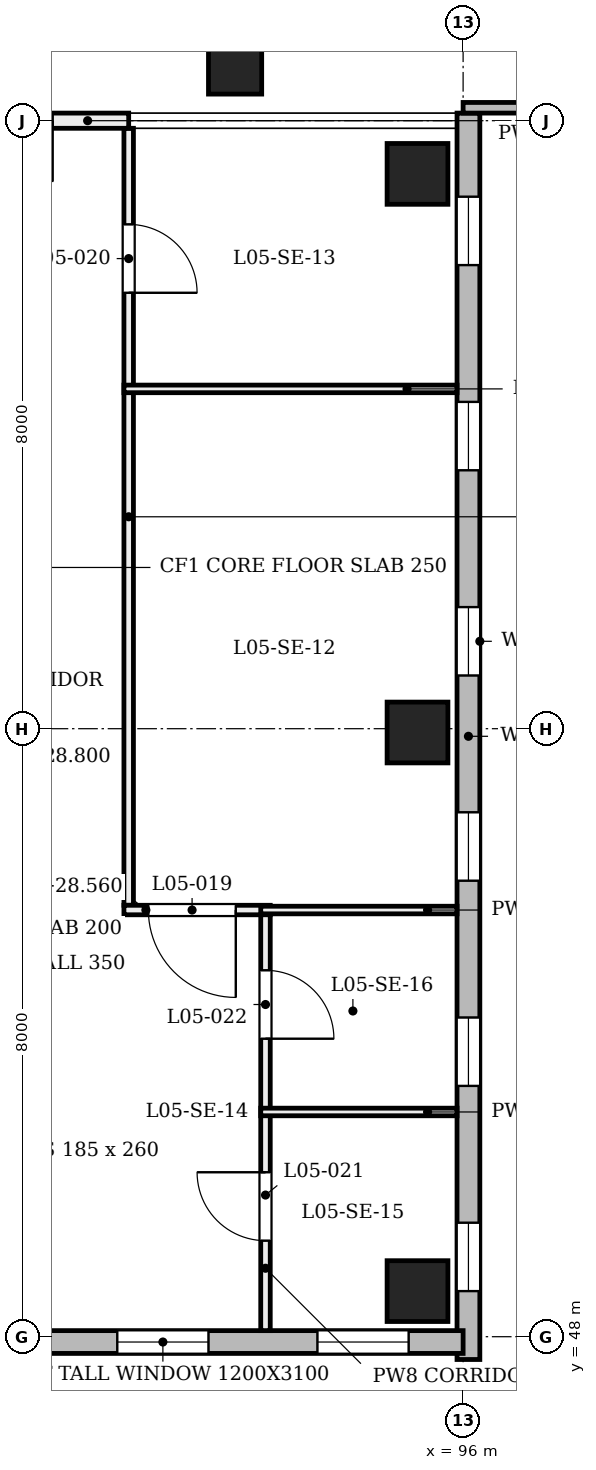
"""IFC4 building model, lengths in metres.
Left out: names, types, materials, properties, quantities, classifications, styles, units other than length and angle.
Written with IfcOpenShell. Run it as: python <this file> out.ifc"""

import sys

from ifc_helpers import new_model, si_unit, direction, frame, frame_2d, origin, origin_2d, place, context, subcontext, project, spatial, rectangle, extrude, element, fill, save


model = new_model("IFC4")
c1 = context("Model", 3, precision=1e-05, world=origin(), true_north=direction((0.0, 1.0)))
c2 = subcontext(c1, "Body", "Model", "MODEL_VIEW")
j1 = project(units=[si_unit("LENGTHUNIT", "METRE"), si_unit("PLANEANGLEUNIT", "RADIAN")], contexts=[c1])
p1 = place(None, origin())
s1 = spatial("IfcSite", under=j1, at=p1, CompositionType="ELEMENT")
p2 = place(p1, origin())
s2 = spatial("IfcBuilding", under=s1, at=p2, CompositionType="ELEMENT")
p3 = place(p2, frame((0.0, 0.0, 24.0)))
s3 = spatial("IfcBuildingStorey", under=s2, at=p3, CompositionType="ELEMENT", Elevation=24.0)
for number, where, z_axis, x_axis in (
    (1, (95.4, 48.6, 0.0), (0.0, 0.0, 1.0), (1.0, 0.0, 0.0)),
    (2, (95.4, 55.95, 0.0), (0.0, 0.0, 1.0), (1.0, 0.0, 0.0)),
    (3, (95.4, 63.3, 0.0), (0.0, 0.0, 1.0), (1.0, 0.0, 0.0)),
):
    element("IfcColumn", number, at=place(p3, frame(where, z_axis=z_axis, x_axis=x_axis)), inside=s3, PredefinedType="COLUMN", context=c2, shape_type="SweptSolid", body=[
        extrude(rectangle(XDim=0.8, YDim=0.8, at=origin_2d()), origin(), (0.0, 0.0, 1.0), 4.8),
    ])
p4 = place(p3, frame((93.0, 64.7, 0.0), z_axis=(0.0, 0.0, 1.0), x_axis=(1.0, 0.0, 0.0)))
e4 = element("IfcColumn", 4, at=p4, inside=s3, PredefinedType="COLUMN", context=c2, shape_type="SweptSolid", body=[
    extrude(rectangle(XDim=0.7, YDim=0.7, at=origin_2d()), origin(), (0.0, 0.0, 1.0), 4.58),
])
p5 = place(p3, frame((96.07, 47.7, 0.0), z_axis=(0.0, 0.0, 1.0), x_axis=(0.0, 1.0, 0.0)))
e5 = element("IfcWall", 5, at=p5, inside=s3, PredefinedType="SOLIDWALL", context=c2, shape_type="SweptSolid", body=[
    extrude(rectangle(XDim=16.4, YDim=0.3, at=frame_2d((8.2, 0.0))), origin(), (0.0, 0.0, 1.0), 3.9),
])
p6 = place(p5, frame((0.9, 0.0, 0.75)))
e6 = element("IfcOpeningElement", 6, at=p6, cuts=e5, PredefinedType="OPENING", context=c2, shape_type="SweptSolid", body=[
    extrude(rectangle(XDim=0.9, YDim=3.1, at=frame_2d((0.45, 1.55))), frame((0.0, 0.16, 0.0), z_axis=(0.0, -1.0, 0.0), x_axis=(1.0, 0.0, 0.0)), (0.0, 0.0, 1.0), 0.32),
])
p7 = place(p5, frame((3.6, 0.0, 0.75)))
e7 = element("IfcOpeningElement", 7, at=p7, cuts=e5, PredefinedType="OPENING", context=c2, shape_type="SweptSolid", body=[
    extrude(rectangle(XDim=0.9, YDim=3.1, at=frame_2d((0.45, 1.55))), frame((0.0, 0.16, 0.0), z_axis=(0.0, -1.0, 0.0), x_axis=(1.0, 0.0, 0.0)), (0.0, 0.0, 1.0), 0.32),
])
p8 = place(p5, frame((6.3, 0.0, 0.75)))
e8 = element("IfcOpeningElement", 8, at=p8, cuts=e5, PredefinedType="OPENING", context=c2, shape_type="SweptSolid", body=[
    extrude(rectangle(XDim=0.9, YDim=3.1, at=frame_2d((0.45, 1.55))), frame((0.0, 0.16, 0.0), z_axis=(0.0, -1.0, 0.0), x_axis=(1.0, 0.0, 0.0)), (0.0, 0.0, 1.0), 0.32),
])
p9 = place(p5, frame((9.0, 0.0, 0.75)))
e9 = element("IfcOpeningElement", 9, at=p9, cuts=e5, PredefinedType="OPENING", context=c2, shape_type="SweptSolid", body=[
    extrude(rectangle(XDim=0.9, YDim=3.1, at=frame_2d((0.45, 1.55))), frame((0.0, 0.16, 0.0), z_axis=(0.0, -1.0, 0.0), x_axis=(1.0, 0.0, 0.0)), (0.0, 0.0, 1.0), 0.32),
])
p10 = place(p5, frame((11.7, 0.0, 0.75)))
e10 = element("IfcOpeningElement", 10, at=p10, cuts=e5, PredefinedType="OPENING", context=c2, shape_type="SweptSolid", body=[
    extrude(rectangle(XDim=0.9, YDim=3.1, at=frame_2d((0.45, 1.55))), frame((0.0, 0.16, 0.0), z_axis=(0.0, -1.0, 0.0), x_axis=(1.0, 0.0, 0.0)), (0.0, 0.0, 1.0), 0.32),
])
p11 = place(p5, frame((14.4, 0.0, 0.75)))
e11 = element("IfcOpeningElement", 11, at=p11, cuts=e5, PredefinedType="OPENING", context=c2, shape_type="SweptSolid", body=[
    extrude(rectangle(XDim=0.9, YDim=3.1, at=frame_2d((0.45, 1.55))), frame((0.0, 0.16, 0.0), z_axis=(0.0, -1.0, 0.0), x_axis=(1.0, 0.0, 0.0)), (0.0, 0.0, 1.0), 0.32),
])
p12 = place(p3, frame((88.1, 47.93, 0.0), z_axis=(0.0, 0.0, 1.0), x_axis=(1.0, 0.0, 0.0)))
e12 = element("IfcWall", 12, at=p12, inside=s3, PredefinedType="SOLIDWALL", context=c2, shape_type="SweptSolid", body=[
    extrude(rectangle(XDim=7.9, YDim=0.3, at=frame_2d((3.95, 0.0))), origin(), (0.0, 0.0, 1.0), 3.9),
])
p13 = place(p12, frame((0.717, 0.0, 0.75)))
e13 = element("IfcOpeningElement", 13, at=p13, cuts=e12, PredefinedType="OPENING", context=c2, shape_type="SweptSolid", body=[
    extrude(rectangle(XDim=1.2, YDim=3.1, at=frame_2d((0.6, 1.55))), frame((0.0, 0.16, 0.0), z_axis=(0.0, -1.0, 0.0), x_axis=(1.0, 0.0, 0.0)), (0.0, 0.0, 1.0), 0.32),
])
p14 = place(p12, frame((3.35, 0.0, 0.75)))
e14 = element("IfcOpeningElement", 14, at=p14, cuts=e12, PredefinedType="OPENING", context=c2, shape_type="SweptSolid", body=[
    extrude(rectangle(XDim=1.2, YDim=3.1, at=frame_2d((0.6, 1.55))), frame((0.0, 0.16, 0.0), z_axis=(0.0, -1.0, 0.0), x_axis=(1.0, 0.0, 0.0)), (0.0, 0.0, 1.0), 0.32),
])
p15 = place(p12, frame((5.983, 0.0, 0.75)))
e15 = element("IfcOpeningElement", 15, at=p15, cuts=e12, PredefinedType="OPENING", context=c2, shape_type="SweptSolid", body=[
    extrude(rectangle(XDim=1.2, YDim=3.1, at=frame_2d((0.6, 1.55))), frame((0.0, 0.16, 0.0), z_axis=(0.0, -1.0, 0.0), x_axis=(1.0, 0.0, 0.0)), (0.0, 0.0, 1.0), 0.32),
])
p16 = place(p3, frame((96.0, 64.17, 0.0), z_axis=(0.0, 0.0, 1.0), x_axis=(1.0, 0.0, 0.0)))
e16 = element("IfcWall", 16, at=p16, inside=s3, PredefinedType="SOLIDWALL", context=c2, shape_type="SweptSolid", body=[
    extrude(rectangle(XDim=5.0, YDim=0.14, at=frame_2d((2.5, 0.0))), origin(), (0.0, 0.0, 1.0), 3.9),
])
p17 = place(p3, frame((91.6, 53.677, 0.0), z_axis=(0.0, 0.0, 1.0), x_axis=(0.0, 1.0, 0.0)))
e17 = element("IfcWall", 17, at=p17, inside=s3, PredefinedType="PARTITIONING", context=c2, shape_type="SweptSolid", body=[
    extrude(rectangle(XDim=10.223, YDim=0.125, at=frame_2d((5.112, 0.0))), origin(), (0.0, 0.0, 1.0), 3.88),
])
p18 = place(p17, frame((8.059, 0.0, 0.0)))
e18 = element("IfcOpeningElement", 18, at=p18, cuts=e17, PredefinedType="OPENING", context=c2, shape_type="SweptSolid", body=[
    extrude(rectangle(XDim=0.9, YDim=2.1, at=frame_2d((0.45, 1.05))), frame((0.0, 0.073, 0.0), z_axis=(0.0, -1.0, 0.0), x_axis=(1.0, 0.0, 0.0)), (0.0, 0.0, 1.0), 0.145),
])
p19 = place(p3, frame((91.538, 53.614, 0.0), z_axis=(0.0, 0.0, 1.0), x_axis=(1.0, 0.0, 0.0)))
e19 = element("IfcWall", 19, at=p19, inside=s3, PredefinedType="PARTITIONING", context=c2, shape_type="SweptSolid", body=[
    extrude(rectangle(XDim=1.925, YDim=0.125, at=frame_2d((0.962, 0.0))), origin(), (0.0, 0.0, 1.0), 4.56),
])
p20 = place(p19, frame((0.322, 0.0, 0.0)))
e20 = element("IfcOpeningElement", 20, at=p20, cuts=e19, PredefinedType="OPENING", context=c2, shape_type="SweptSolid", body=[
    extrude(rectangle(XDim=1.15, YDim=2.1, at=frame_2d((0.575, 1.05))), frame((0.0, 0.073, 0.0), z_axis=(0.0, -1.0, 0.0), x_axis=(1.0, 0.0, 0.0)), (0.0, 0.0, 1.0), 0.145),
])
p21 = place(p3, frame((93.337, 53.614, 0.0), z_axis=(0.0, 0.0, 1.0), x_axis=(1.0, 0.0, 0.0)))
e21 = element("IfcWall", 21, at=p21, inside=s3, PredefinedType="PARTITIONING", context=c2, shape_type="SweptSolid", body=[
    extrude(rectangle(XDim=2.583, YDim=0.1, at=frame_2d((1.291, 0.0))), origin(), (0.0, 0.0, 1.0), 3.88),
])
p22 = place(p3, frame((91.538, 60.471, 0.0), z_axis=(0.0, 0.0, 1.0), x_axis=(1.0, 0.0, 0.0)))
e22 = element("IfcWall", 22, at=p22, inside=s3, PredefinedType="PARTITIONING", context=c2, shape_type="SweptSolid", body=[
    extrude(rectangle(XDim=4.382, YDim=0.1, at=frame_2d((2.191, 0.0))), origin(), (0.0, 0.0, 1.0), 3.88),
])
p23 = place(p3, frame((93.4, 48.08, 0.0), z_axis=(0.0, 0.0, 1.0), x_axis=(0.0, 1.0, 0.0)))
e23 = element("IfcWall", 23, at=p23, inside=s3, PredefinedType="PARTITIONING", context=c2, shape_type="SweptSolid", body=[
    extrude(rectangle(XDim=5.472, YDim=0.125, at=frame_2d((2.736, 0.0))), origin(), (0.0, 0.0, 1.0), 3.88),
])
p24 = place(p23, frame((1.184, 0.0, 0.0)))
e24 = element("IfcOpeningElement", 24, at=p24, cuts=e23, PredefinedType="OPENING", context=c2, shape_type="SweptSolid", body=[
    extrude(rectangle(XDim=0.9, YDim=2.1, at=frame_2d((0.45, 1.05))), frame((0.0, 0.073, 0.0), z_axis=(0.0, -1.0, 0.0), x_axis=(1.0, 0.0, 0.0)), (0.0, 0.0, 1.0), 0.145),
])
p25 = place(p23, frame((3.841, 0.0, 0.0)))
e25 = element("IfcOpeningElement", 25, at=p25, cuts=e23, PredefinedType="OPENING", context=c2, shape_type="SweptSolid", body=[
    extrude(rectangle(XDim=0.9, YDim=2.1, at=frame_2d((0.45, 1.05))), frame((0.0, 0.073, 0.0), z_axis=(0.0, -1.0, 0.0), x_axis=(1.0, 0.0, 0.0)), (0.0, 0.0, 1.0), 0.145),
])
p26 = place(p3, frame((93.337, 50.957, 0.0), z_axis=(0.0, 0.0, 1.0), x_axis=(1.0, 0.0, 0.0)))
e26 = element("IfcWall", 26, at=p26, inside=s3, PredefinedType="PARTITIONING", context=c2, shape_type="SweptSolid", body=[
    extrude(rectangle(XDim=2.583, YDim=0.1, at=frame_2d((1.291, 0.0))), origin(), (0.0, 0.0, 1.0), 3.88),
])
p27 = place(p3, frame((88.0, 64.0, 0.0), z_axis=(0.0, 0.0, 1.0), x_axis=(1.0, 0.0, 0.0)))
e27 = element("IfcWall", 27, at=p27, inside=s3, PredefinedType="PARTITIONING", context=c2, shape_type="SweptSolid", body=[
    extrude(rectangle(XDim=3.6, YDim=0.2, at=frame_2d((1.8, 0.0))), origin(), (0.0, 0.0, 1.0), 3.88),
])
p28 = place(p27, frame((1.0, 0.0, 0.0)))
e28 = element("IfcOpeningElement", 28, at=p28, cuts=e27, PredefinedType="OPENING", context=c2, shape_type="SweptSolid", body=[
    extrude(rectangle(XDim=1.6, YDim=2.1, at=frame_2d((0.8, 1.05))), frame((0.0, 0.11, 0.0), z_axis=(0.0, -1.0, 0.0), x_axis=(1.0, 0.0, 0.0)), (0.0, 0.0, 1.0), 0.22),
])
p29 = place(p6, origin())
e29 = element("IfcWindow", 29, at=p29, inside=s3, PartitioningType="SINGLE_PANEL", PredefinedType="WINDOW", context=c2, shape_type="SweptSolid", body=[
    extrude(rectangle(XDim=0.9, YDim=3.1, at=frame_2d((0.45, 1.55))), frame((0.0, 0.03, 0.0), z_axis=(0.0, -1.0, 0.0), x_axis=(1.0, 0.0, 0.0)), (0.0, 0.0, 1.0), 0.06),
])
fill(e6, e29)
p30 = place(p7, origin())
e30 = element("IfcWindow", 30, at=p30, inside=s3, PartitioningType="SINGLE_PANEL", PredefinedType="WINDOW", context=c2, shape_type="SweptSolid", body=[
    extrude(rectangle(XDim=0.9, YDim=3.1, at=frame_2d((0.45, 1.55))), frame((0.0, 0.03, 0.0), z_axis=(0.0, -1.0, 0.0), x_axis=(1.0, 0.0, 0.0)), (0.0, 0.0, 1.0), 0.06),
])
fill(e7, e30)
p31 = place(p8, origin())
e31 = element("IfcWindow", 31, at=p31, inside=s3, PartitioningType="SINGLE_PANEL", PredefinedType="WINDOW", context=c2, shape_type="SweptSolid", body=[
    extrude(rectangle(XDim=0.9, YDim=3.1, at=frame_2d((0.45, 1.55))), frame((0.0, 0.03, 0.0), z_axis=(0.0, -1.0, 0.0), x_axis=(1.0, 0.0, 0.0)), (0.0, 0.0, 1.0), 0.06),
])
fill(e8, e31)
p32 = place(p9, origin())
e32 = element("IfcWindow", 32, at=p32, inside=s3, PartitioningType="SINGLE_PANEL", PredefinedType="WINDOW", context=c2, shape_type="SweptSolid", body=[
    extrude(rectangle(XDim=0.9, YDim=3.1, at=frame_2d((0.45, 1.55))), frame((0.0, 0.03, 0.0), z_axis=(0.0, -1.0, 0.0), x_axis=(1.0, 0.0, 0.0)), (0.0, 0.0, 1.0), 0.06),
])
fill(e9, e32)
p33 = place(p10, origin())
e33 = element("IfcWindow", 33, at=p33, inside=s3, PartitioningType="SINGLE_PANEL", PredefinedType="WINDOW", context=c2, shape_type="SweptSolid", body=[
    extrude(rectangle(XDim=0.9, YDim=3.1, at=frame_2d((0.45, 1.55))), frame((0.0, 0.03, 0.0), z_axis=(0.0, -1.0, 0.0), x_axis=(1.0, 0.0, 0.0)), (0.0, 0.0, 1.0), 0.06),
])
fill(e10, e33)
p34 = place(p11, origin())
e34 = element("IfcWindow", 34, at=p34, inside=s3, PartitioningType="SINGLE_PANEL", PredefinedType="WINDOW", context=c2, shape_type="SweptSolid", body=[
    extrude(rectangle(XDim=0.9, YDim=3.1, at=frame_2d((0.45, 1.55))), frame((0.0, 0.03, 0.0), z_axis=(0.0, -1.0, 0.0), x_axis=(1.0, 0.0, 0.0)), (0.0, 0.0, 1.0), 0.06),
])
fill(e11, e34)
p35 = place(p14, origin())
e35 = element("IfcWindow", 35, at=p35, inside=s3, PartitioningType="SINGLE_PANEL", PredefinedType="WINDOW", context=c2, shape_type="SweptSolid", body=[
    extrude(rectangle(XDim=1.2, YDim=3.1, at=frame_2d((0.6, 1.55))), frame((0.0, 0.03, 0.0), z_axis=(0.0, -1.0, 0.0), x_axis=(1.0, 0.0, 0.0)), (0.0, 0.0, 1.0), 0.06),
])
fill(e14, e35)
p36 = place(p15, origin())
e36 = element("IfcWindow", 36, at=p36, inside=s3, PartitioningType="SINGLE_PANEL", PredefinedType="WINDOW", context=c2, shape_type="SweptSolid", body=[
    extrude(rectangle(XDim=1.2, YDim=3.1, at=frame_2d((0.6, 1.55))), frame((0.0, 0.03, 0.0), z_axis=(0.0, -1.0, 0.0), x_axis=(1.0, 0.0, 0.0)), (0.0, 0.0, 1.0), 0.06),
])
fill(e15, e36)
p37 = place(p20, origin())
e37 = element("IfcDoor", 37, at=p37, inside=s3, OperationType="SINGLE_SWING_RIGHT", PredefinedType="DOOR", context=c2, shape_type="SweptSolid", body=[
    extrude(rectangle(XDim=1.15, YDim=2.1, at=frame_2d((0.575, 1.05))), frame((0.0, 0.025, 0.0), z_axis=(0.0, -1.0, 0.0), x_axis=(1.0, 0.0, 0.0)), (0.0, 0.0, 1.0), 0.05),
])
fill(e20, e37)
p38 = place(p18, frame((0.9, 0.0, 0.0), z_axis=(0.0, 0.0, 1.0), x_axis=(-1.0, 0.0, 0.0)))
e38 = element("IfcDoor", 38, at=p38, inside=s3, OperationType="SINGLE_SWING_LEFT", PredefinedType="DOOR", context=c2, shape_type="SweptSolid", body=[
    extrude(rectangle(XDim=0.9, YDim=2.1, at=frame_2d((0.45, 1.05))), frame((0.0, 0.025, 0.0), z_axis=(0.0, -1.0, 0.0), x_axis=(1.0, 0.0, 0.0)), (0.0, 0.0, 1.0), 0.05),
])
fill(e18, e38)
p39 = place(p24, frame((0.9, 0.0, 0.0), z_axis=(0.0, 0.0, 1.0), x_axis=(-1.0, 0.0, 0.0)))
e39 = element("IfcDoor", 39, at=p39, inside=s3, OperationType="SINGLE_SWING_RIGHT", PredefinedType="DOOR", context=c2, shape_type="SweptSolid", body=[
    extrude(rectangle(XDim=0.9, YDim=2.1, at=frame_2d((0.45, 1.05))), frame((0.0, 0.025, 0.0), z_axis=(0.0, -1.0, 0.0), x_axis=(1.0, 0.0, 0.0)), (0.0, 0.0, 1.0), 0.05),
])
fill(e24, e39)
p40 = place(p25, frame((0.9, 0.0, 0.0), z_axis=(0.0, 0.0, 1.0), x_axis=(-1.0, 0.0, 0.0)))
e40 = element("IfcDoor", 40, at=p40, inside=s3, OperationType="SINGLE_SWING_LEFT", PredefinedType="DOOR", context=c2, shape_type="SweptSolid", body=[
    extrude(rectangle(XDim=0.9, YDim=2.1, at=frame_2d((0.45, 1.05))), frame((0.0, 0.025, 0.0), z_axis=(0.0, -1.0, 0.0), x_axis=(1.0, 0.0, 0.0)), (0.0, 0.0, 1.0), 0.05),
])
fill(e25, e40)
save(model, sys.argv[1])
